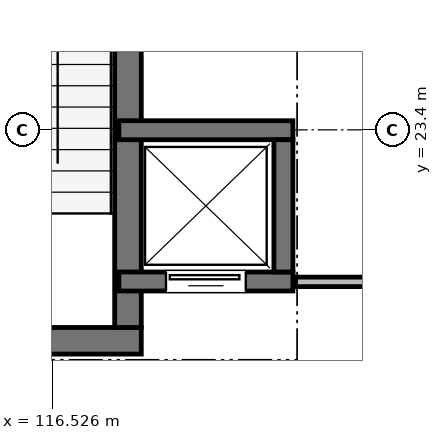
"""IFC4 building model, lengths in metres.
Left out: names, types, materials, properties, quantities, classifications, styles, units other than length and angle.
Written with IfcOpenShell. Run it as: python <this file> out.ifc"""

import sys

from ifc_helpers import new_model, si_unit, direction, frame, frame_2d, origin, place, context, subcontext, project, spatial, rectangle, extrude, element, fill, save


model = new_model("IFC4")
c1 = context("Model", 3, precision=1e-05, world=origin(), true_north=direction((0.0, 1.0)))
c2 = subcontext(c1, "Body", "Model", "MODEL_VIEW")
j1 = project(units=[si_unit("LENGTHUNIT", "METRE"), si_unit("PLANEANGLEUNIT", "RADIAN")], contexts=[c1])
p1 = place(None, origin())
s1 = spatial("IfcSite", under=j1, at=p1, CompositionType="ELEMENT")
p2 = place(p1, origin())
s2 = spatial("IfcBuilding", under=s1, at=p2, CompositionType="ELEMENT")
p3 = place(p2, frame((0.0, 0.0, 10.2)))
s3 = spatial("IfcBuildingStorey", under=s2, at=p3, CompositionType="ELEMENT", Elevation=10.2)
p4 = place(p3, frame((113.85, 20.625, 0.0), z_axis=(0.0, 0.0, 1.0), x_axis=(1.0, 0.0, 0.0)))
e1 = element("IfcWall", 1, at=p4, inside=s3, PredefinedType="SHEAR", context=c2, shape_type="SweptSolid", body=[
    extrude(rectangle(XDim=3.85, YDim=0.35, at=frame_2d((1.925, 0.0))), origin(), (0.0, 0.0, 1.0), 4.58),
])
p5 = place(p4, frame((0.45, 0.0, 0.0)))
e2 = element("IfcOpeningElement", 2, at=p5, cuts=e1, PredefinedType="OPENING", context=c2, shape_type="SweptSolid", body=[
    extrude(rectangle(XDim=1.5, YDim=2.2, at=frame_2d((0.75, 1.1))), frame((0.0, 0.185, 0.0), z_axis=(0.0, -1.0, 0.0), x_axis=(1.0, 0.0, 0.0)), (0.0, 0.0, 1.0), 0.37),
])
p6 = place(p3, frame((117.525, 20.8, 0.0), z_axis=(0.0, 0.0, 1.0), x_axis=(0.0, 1.0, 0.0)))
e3 = element("IfcWall", 3, at=p6, inside=s3, PredefinedType="SHEAR", context=c2, shape_type="SweptSolid", body=[
    extrude(rectangle(XDim=7.05, YDim=0.35, at=frame_2d((3.525, 0.0))), origin(), (0.0, 0.0, 1.0), 4.58),
])
p7 = place(p3, frame((117.405, 21.405, 0.0), z_axis=(0.0, 0.0, 1.0), x_axis=(1.0, 0.0, 0.0)))
e4 = element("IfcWall", 4, at=p7, inside=s3, PredefinedType="SHEAR", context=c2, shape_type="SweptSolid", body=[
    extrude(rectangle(XDim=2.29, YDim=0.25, at=frame_2d((1.145, 0.0))), origin(), (0.0, 0.0, 1.0), 4.56),
])
p8 = place(p7, frame((0.62, 0.0, 0.0)))
e5 = element("IfcOpeningElement", 5, at=p8, cuts=e4, PredefinedType="OPENING", context=c2, shape_type="SweptSolid", body=[
    extrude(rectangle(XDim=1.05, YDim=2.15, at=frame_2d((0.525, 1.075))), frame((0.0, 0.135, 0.0), z_axis=(0.0, -1.0, 0.0), x_axis=(1.0, 0.0, 0.0)), (0.0, 0.0, 1.0), 0.27),
])
p9 = place(p3, frame((117.405, 23.395, 0.0), z_axis=(0.0, 0.0, 1.0), x_axis=(1.0, 0.0, 0.0)))
e6 = element("IfcWall", 6, at=p9, inside=s3, PredefinedType="SHEAR", context=c2, shape_type="SweptSolid", body=[
    extrude(rectangle(XDim=2.29, YDim=0.25, at=frame_2d((1.145, 0.0))), origin(), (0.0, 0.0, 1.0), 4.56),
])
p10 = place(p3, frame((119.57, 21.53, 0.0), z_axis=(0.0, 0.0, 1.0), x_axis=(0.0, 1.0, 0.0)))
e7 = element("IfcWall", 7, at=p10, inside=s3, PredefinedType="SHEAR", context=c2, shape_type="SweptSolid", body=[
    extrude(rectangle(XDim=1.74, YDim=0.25, at=frame_2d((0.87, 0.0))), origin(), (0.0, 0.0, 1.0), 4.56),
])
p11 = place(p3, frame((119.73, 21.4, 0.0), z_axis=(0.0, 0.0, 1.0), x_axis=(1.0, 0.0, 0.0)))
e8 = element("IfcWall", 8, at=p11, inside=s3, PredefinedType="PARTITIONING", context=c2, shape_type="SweptSolid", body=[
    extrude(rectangle(XDim=14.24, YDim=0.125, at=frame_2d((7.12, 0.0))), origin(), (0.0, 0.0, 1.0), 3.865),
])
p12 = place(p11, frame((6.53, 0.0, 0.0)))
e9 = element("IfcOpeningElement", 9, at=p12, cuts=e8, PredefinedType="OPENING", context=c2, shape_type="SweptSolid", body=[
    extrude(rectangle(XDim=1.18, YDim=2.2, at=frame_2d((0.59, 1.1))), frame((0.0, 0.073, 0.0), z_axis=(0.0, -1.0, 0.0), x_axis=(1.0, 0.0, 0.0)), (0.0, 0.0, 1.0), 0.145),
])
p13 = place(p8, frame((1.05, 0.0, 0.0), z_axis=(0.0, 0.0, 1.0), x_axis=(-1.0, 0.0, 0.0)))
e10 = element("IfcDoor", 10, at=p13, inside=s3, OperationType="SLIDING_TO_RIGHT", PredefinedType="DOOR", context=c2, shape_type="SweptSolid", body=[
    extrude(rectangle(XDim=1.05, YDim=2.15, at=frame_2d((0.525, 1.075))), frame((0.0, 0.025, 0.0), z_axis=(0.0, -1.0, 0.0), x_axis=(1.0, 0.0, 0.0)), (0.0, 0.0, 1.0), 0.05),
])
fill(e5, e10)
save(model, sys.argv[1])
